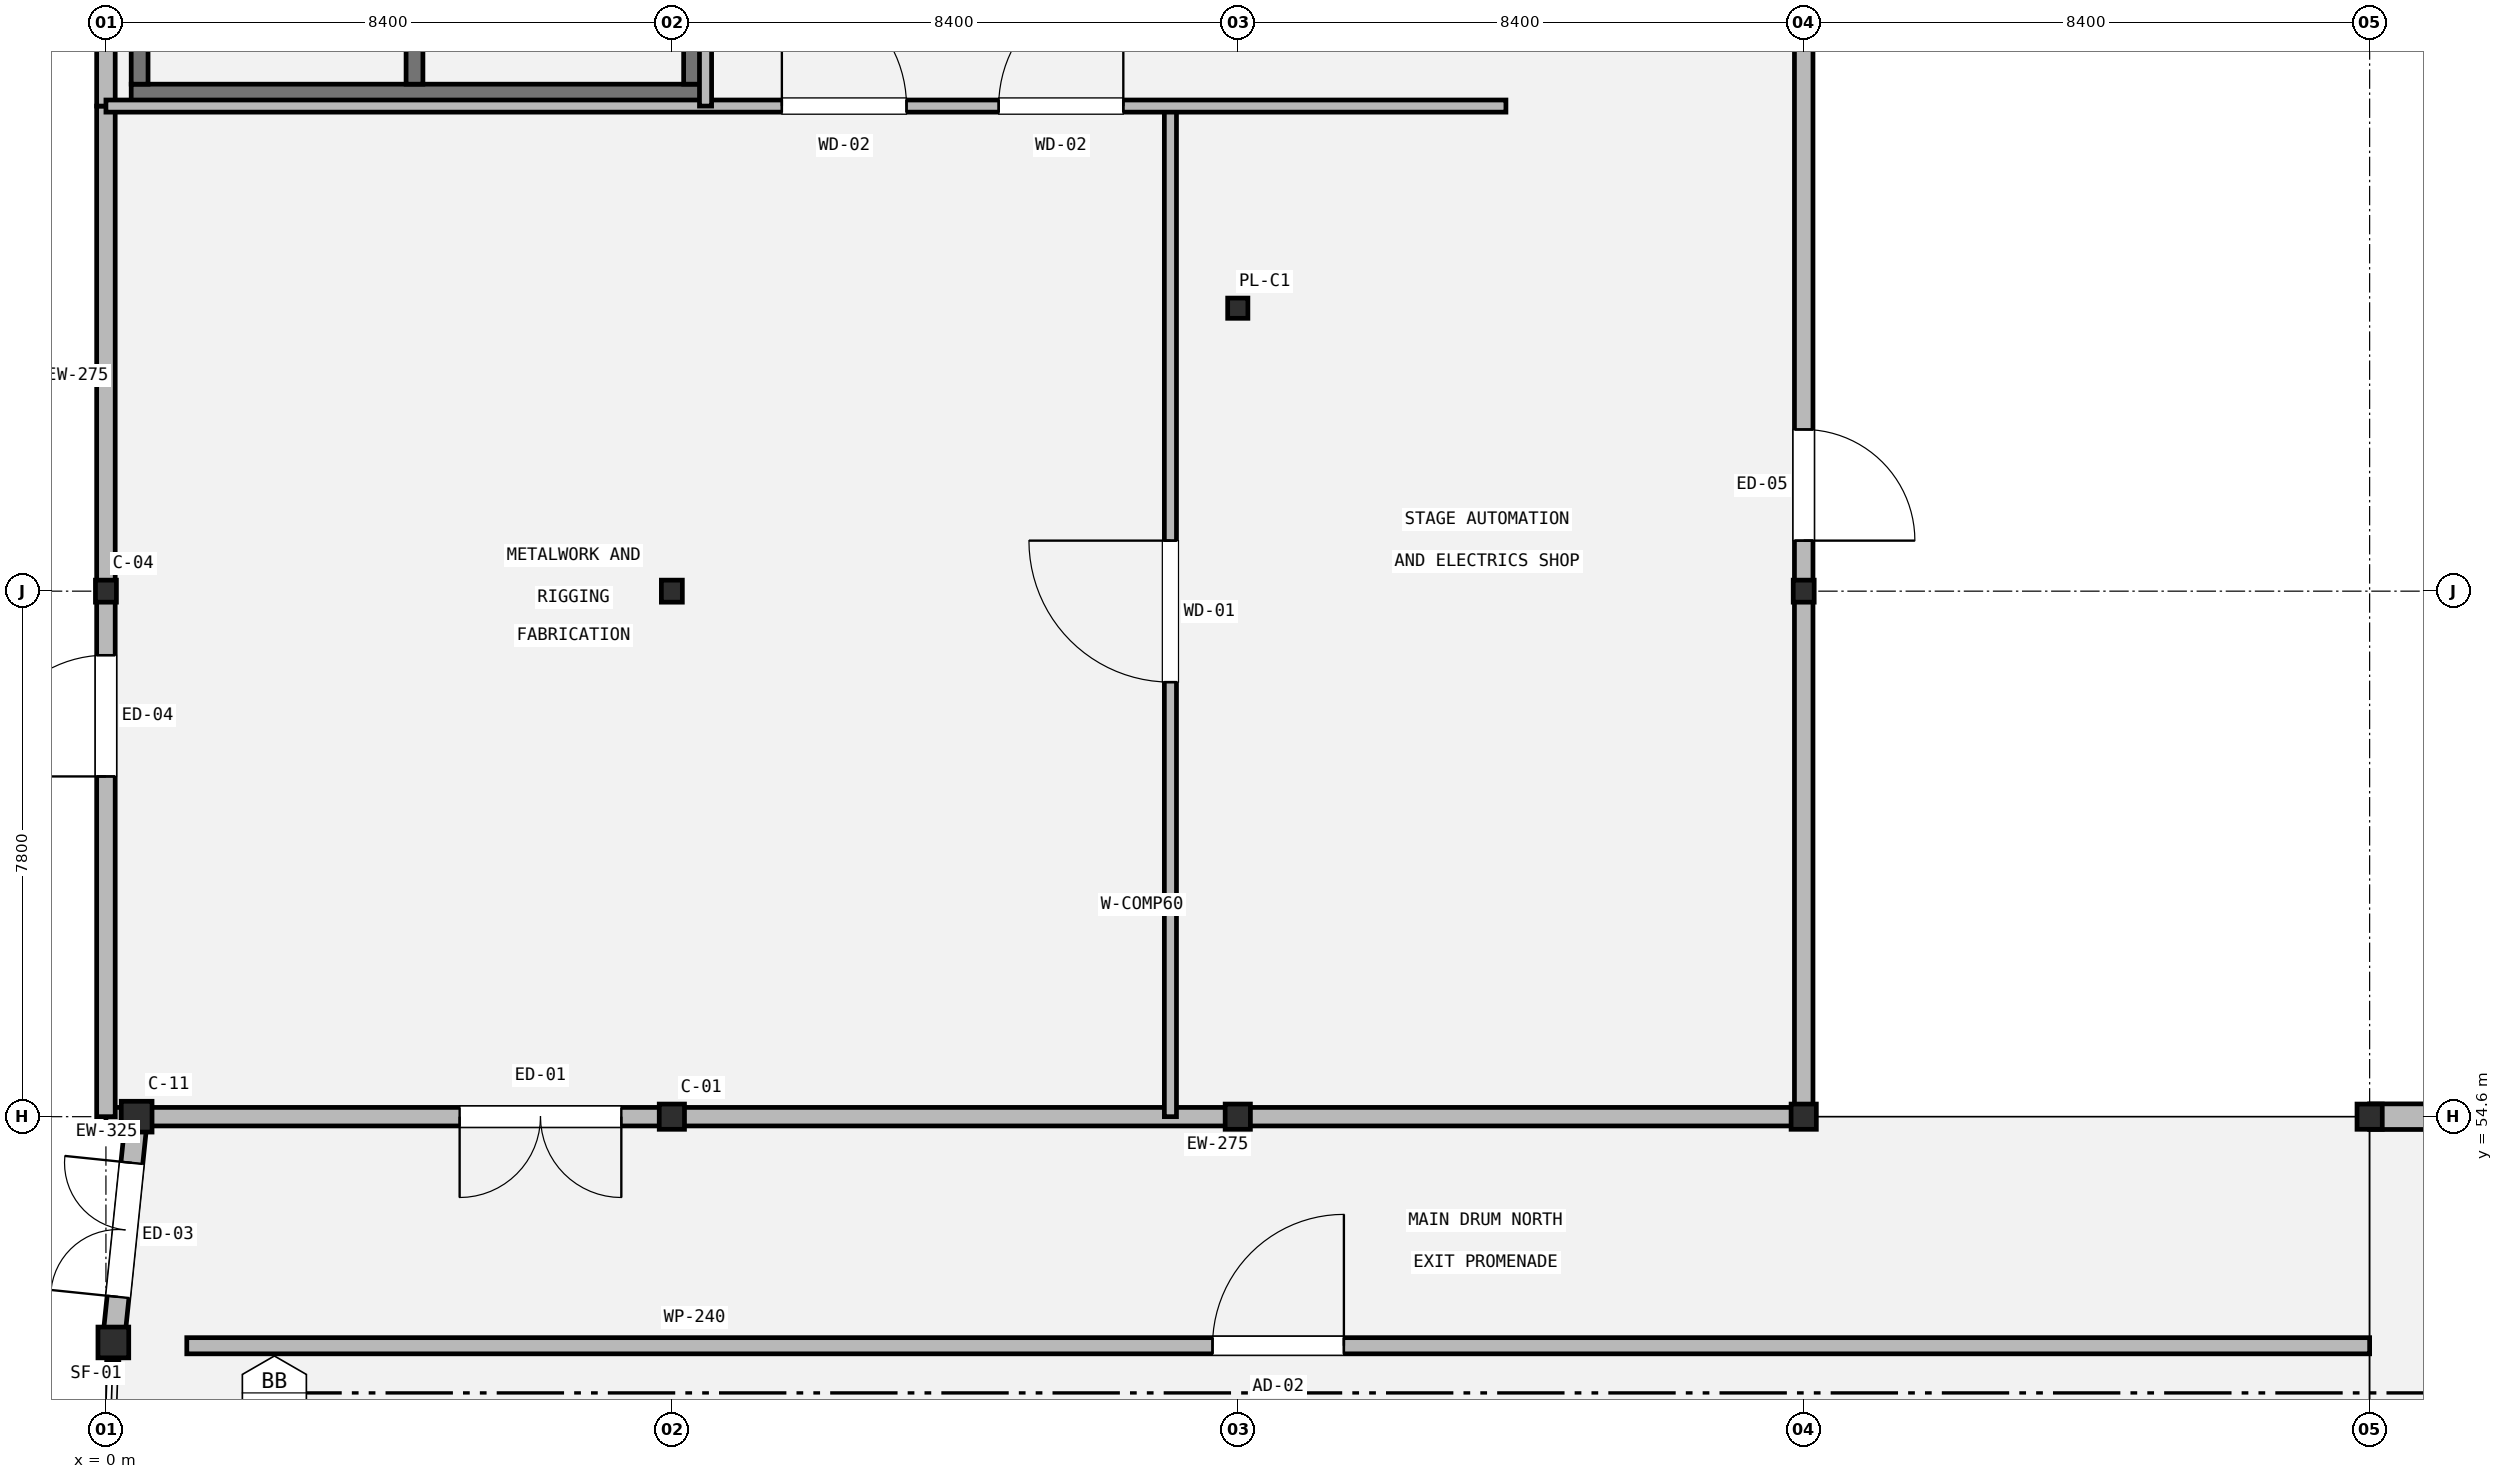
"""IFC4 building model, lengths in metres.
Left out: names, types, materials, properties, quantities, classifications, styles, units other than length and angle.
Written with IfcOpenShell. Run it as: python <this file> out.ifc"""

import sys

from ifc_helpers import new_model, si_unit, direction, frame, frame_2d, origin, origin_2d, place, context, subcontext, project, spatial, rectangle, hollow_rectangle, hollow_circle, i_section, extrude, element, fill, save


model = new_model("IFC4")
c1 = context("Model", 3, precision=1e-05, world=origin(), true_north=direction((0.0, 1.0)))
c2 = subcontext(c1, "Body", "Model", "MODEL_VIEW")
j1 = project(units=[si_unit("LENGTHUNIT", "METRE"), si_unit("PLANEANGLEUNIT", "RADIAN")], contexts=[c1])
p1 = place(None, origin())
s1 = spatial("IfcSite", under=j1, at=p1, CompositionType="ELEMENT")
p2 = place(p1, origin())
s2 = spatial("IfcBuilding", under=s1, at=p2, CompositionType="ELEMENT")
p3 = place(p2, origin())
s3 = spatial("IfcBuildingStorey", under=s2, at=p3, CompositionType="ELEMENT", Elevation=0.0)
for number, where, z_axis, x_axis in (
    (1, (8.4, 54.6, 0.0), (0.0, 0.0, 1.0), (1.0, 0.0, 0.0)),
    (2, (16.8, 54.6, 0.0), (0.0, 0.0, 1.0), (1.0, 0.0, 0.0)),
    (3, (25.2, 54.6, 0.0), (0.0, 0.0, 1.0), (1.0, 0.0, 0.0)),
    (4, (33.6, 54.6, 0.0), (0.0, 0.0, 1.0), (1.0, 0.0, 0.0)),
):
    element("IfcColumn", number, at=place(p3, frame(where, z_axis=z_axis, x_axis=x_axis)), inside=s3, PredefinedType="COLUMN", context=c2, shape_type="SweptSolid", body=[
        extrude(i_section(OverallWidth=0.375, OverallDepth=0.375, WebThickness=0.017, FlangeThickness=0.027, FilletRadius=0.015, at=origin_2d()), origin(), (0.0, 0.0, 1.0), 5.4),
    ])
for number, where, z_axis, x_axis in (
    (5, (0.456, 54.6, 0.0), (0.0, 0.0, 1.0), (1.0, 0.0, 0.0)),
    (6, (0.11, 51.249, 0.0), (0.0, 0.0, 1.0), (1.0, 0.0, 0.0)),
):
    element("IfcColumn", number, at=place(p3, frame(where, z_axis=z_axis, x_axis=x_axis)), inside=s3, PredefinedType="COLUMN", context=c2, shape_type="SweptSolid", body=[
        extrude(hollow_circle(Radius=0.229, WallThickness=0.02, at=origin_2d()), origin(), (0.0, 0.0, 1.0), 5.4),
    ])
for number, where, z_axis, x_axis in (
    (7, (0.0, 62.4, 0.0), (0.0, 0.0, 1.0), (1.0, 0.0, 0.0)),
    (8, (8.4, 62.4, 0.0), (0.0, 0.0, 1.0), (1.0, 0.0, 0.0)),
    (9, (25.2, 62.4, 0.0), (0.0, 0.0, 1.0), (1.0, 0.0, 0.0)),
):
    element("IfcColumn", number, at=place(p3, frame(where, z_axis=z_axis, x_axis=x_axis)), inside=s3, PredefinedType="COLUMN", context=c2, shape_type="SweptSolid", body=[
        extrude(i_section(OverallWidth=0.311, OverallDepth=0.327, WebThickness=0.016, FlangeThickness=0.025, FilletRadius=0.015, at=origin_2d()), origin(), (0.0, 0.0, 1.0), 5.4),
    ])
p4 = place(p3, frame((16.8, 66.6, 0.0), z_axis=(0.0, 0.0, 1.0), x_axis=(1.0, 0.0, 0.0)))
e10 = element("IfcColumn", 10, at=p4, inside=s3, PredefinedType="PILASTER", context=c2, shape_type="SweptSolid", body=[
    extrude(hollow_rectangle(XDim=0.3, YDim=0.3, WallThickness=0.016, at=origin_2d()), origin(), (0.0, 0.0, 1.0), 5.4),
])
p5 = place(p3, frame((0.11, 51.249, 0.0), z_axis=(0.0, 0.0, 1.0), x_axis=(0.102609885069, 0.994721675388, 0.0)))
e11 = element("IfcWall", 11, at=p5, inside=s3, PredefinedType="STANDARD", context=c2, shape_type="SweptSolid", body=[
    extrude(rectangle(XDim=3.369, YDim=0.325, at=frame_2d((1.685, 0.0))), origin(), (0.0, 0.0, 1.0), 4.692),
])
p6 = place(p5, frame((0.68, 0.0, 0.0)))
e12 = element("IfcOpeningElement", 12, at=p6, cuts=e11, PredefinedType="OPENING", context=c2, shape_type="SweptSolid", body=[
    extrude(rectangle(XDim=2.0, YDim=2.45, at=frame_2d((1.0, 1.225))), frame((0.0, 0.172, 0.0), z_axis=(0.0, -1.0, 0.0), x_axis=(1.0, 0.0, 0.0)), (0.0, 0.0, 1.0), 0.345),
])
p7 = place(p3, frame((33.6, 54.6, 0.0), z_axis=(0.0, 0.0, 1.0), x_axis=(1.0, 0.0, 0.0)))
e13 = element("IfcWall", 13, at=p7, inside=s3, PredefinedType="STANDARD", context=c2, shape_type="SweptSolid", body=[
    extrude(rectangle(XDim=8.4, YDim=0.38, at=frame_2d((4.2, 0.0))), origin(), (0.0, 0.0, 1.0), 4.632),
])
p8 = place(p7, frame((5.8, 0.0, 0.0)))
e14 = element("IfcOpeningElement", 14, at=p8, cuts=e13, PredefinedType="OPENING", context=c2, shape_type="SweptSolid", body=[
    extrude(rectangle(XDim=1.8, YDim=2.4, at=frame_2d((0.9, 1.2))), frame((0.0, 0.2, 0.0), z_axis=(0.0, -1.0, 0.0), x_axis=(1.0, 0.0, 0.0)), (0.0, 0.0, 1.0), 0.4),
])
p9 = place(p3, frame((25.2, 54.6, 0.0), z_axis=(0.0, 0.0, 1.0), x_axis=(-1.0, 0.0, 0.0)))
e15 = element("IfcWall", 15, at=p9, inside=s3, PredefinedType="STANDARD", context=c2, shape_type="SweptSolid", body=[
    extrude(rectangle(XDim=25.2, YDim=0.275, at=frame_2d((12.6, 0.0))), origin(), (0.0, 0.0, 1.0), 4.412),
])
p10 = place(p9, frame((17.55, 0.0, 0.0)))
e16 = element("IfcOpeningElement", 16, at=p10, cuts=e15, PredefinedType="OPENING", context=c2, shape_type="SweptSolid", body=[
    extrude(rectangle(XDim=2.4, YDim=2.6, at=frame_2d((1.2, 1.3))), frame((0.0, 0.147, 0.0), z_axis=(0.0, -1.0, 0.0), x_axis=(1.0, 0.0, 0.0)), (0.0, 0.0, 1.0), 0.295),
])
p11 = place(p3, frame((0.0, 54.6, 0.0), z_axis=(0.0, 0.0, 1.0), x_axis=(0.0, 1.0, 0.0)))
e17 = element("IfcWall", 17, at=p11, inside=s3, PredefinedType="STANDARD", context=c2, shape_type="SweptSolid", body=[
    extrude(rectangle(XDim=15.0, YDim=0.275, at=frame_2d((7.5, 0.0))), origin(), (0.0, 0.0, 1.0), 4.622),
])
p12 = place(p11, frame((5.05, 0.0, 0.0)))
e18 = element("IfcOpeningElement", 18, at=p12, cuts=e17, PredefinedType="OPENING", context=c2, shape_type="SweptSolid", body=[
    extrude(rectangle(XDim=1.8, YDim=2.4, at=frame_2d((0.9, 1.2))), frame((0.0, 0.147, 0.0), z_axis=(0.0, -1.0, 0.0), x_axis=(1.0, 0.0, 0.0)), (0.0, 0.0, 1.0), 0.295),
])
p13 = place(p3, frame((0.0, 69.6, 0.0), z_axis=(0.0, 0.0, 1.0), x_axis=(0.0, 1.0, 0.0)))
e19 = element("IfcWall", 19, at=p13, inside=s3, PredefinedType="STANDARD", context=c2, shape_type="SweptSolid", body=[
    extrude(rectangle(XDim=11.0, YDim=0.275, at=frame_2d((5.5, 0.0))), origin(), (0.0, 0.0, 1.0), 4.154),
])
p14 = place(p3, frame((25.2, 70.8, 0.0), z_axis=(0.0, 0.0, 1.0), x_axis=(0.0, -1.0, 0.0)))
e20 = element("IfcWall", 20, at=p14, inside=s3, PredefinedType="STANDARD", context=c2, shape_type="SweptSolid", body=[
    extrude(rectangle(XDim=16.2, YDim=0.275, at=frame_2d((8.1, 0.0))), origin(), (0.0, 0.0, 1.0), 4.154),
])
p15 = place(p14, frame((6.0, 0.0, 0.0)))
e21 = element("IfcOpeningElement", 21, at=p15, cuts=e20, PredefinedType="OPENING", context=c2, shape_type="SweptSolid", body=[
    extrude(rectangle(XDim=1.65, YDim=2.35, at=frame_2d((0.825, 1.175))), frame((0.0, 0.147, 0.0), z_axis=(0.0, -1.0, 0.0), x_axis=(1.0, 0.0, 0.0)), (0.0, 0.0, 1.0), 0.295),
])
p16 = place(p3, frame((8.825, 69.8, 0.0), z_axis=(0.0, 0.0, 1.0), x_axis=(-1.0, 0.0, 0.0)))
e22 = element("IfcWall", 22, at=p16, inside=s3, PredefinedType="SHEAR", context=c2, shape_type="SweptSolid", body=[
    extrude(rectangle(XDim=8.45, YDim=0.25, at=frame_2d((4.225, 0.0))), origin(), (0.0, 0.0, 1.0), 5.18),
])
for number, where, z_axis, x_axis in (
    (23, (0.5, 69.925, 0.0), (0.0, 0.0, 1.0), (0.0, 1.0, 0.0)),
    (24, (8.7, 79.935, 0.0), (0.0, 0.0, 1.0), (0.0, -1.0, 0.0)),
):
    element("IfcWall", number, at=place(p3, frame(where, z_axis=z_axis, x_axis=x_axis)), inside=s3, PredefinedType="SHEAR", context=c2, shape_type="SweptSolid", body=[
        extrude(rectangle(XDim=10.01, YDim=0.25, at=frame_2d((5.005, 0.0))), origin(), (0.0, 0.0, 1.0), 5.18),
    ])
p17 = place(p3, frame((4.58, 79.935, 0.0), z_axis=(0.0, 0.0, 1.0), x_axis=(0.0, -1.0, 0.0)))
e25 = element("IfcWall", 25, at=p17, inside=s3, PredefinedType="SHEAR", context=c2, shape_type="SweptSolid", body=[
    extrude(rectangle(XDim=10.01, YDim=0.25, at=frame_2d((5.005, 0.0))), origin(), (0.0, 0.0, 1.0), 5.18),
])
p18 = place(p17, frame((8.36, 0.0, 0.0)))
e26 = element("IfcOpeningElement", 26, at=p18, cuts=e25, PredefinedType="OPENING", context=c2, shape_type="SweptSolid", body=[
    extrude(rectangle(XDim=1.1, YDim=2.15, at=frame_2d((0.55, 1.075))), frame((0.0, 0.135, 0.0), z_axis=(0.0, -1.0, 0.0), x_axis=(1.0, 0.0, 0.0)), (0.0, 0.0, 1.0), 0.27),
])
p19 = place(p3, frame((1.2, 51.2, 0.0), z_axis=(0.0, 0.0, 1.0), x_axis=(1.0, 0.0, 0.0)))
e27 = element("IfcWall", 27, at=p19, inside=s3, PredefinedType="PARTITIONING", context=c2, shape_type="SweptSolid", body=[
    extrude(rectangle(XDim=32.4, YDim=0.24, at=frame_2d((16.2, 0.0))), origin(), (0.0, 0.0, 1.0), 4.412),
])
p20 = place(p19, frame((15.225, 0.0, 0.0)))
e28 = element("IfcOpeningElement", 28, at=p20, cuts=e27, PredefinedType="OPENING", context=c2, shape_type="SweptSolid", body=[
    extrude(rectangle(XDim=1.95, YDim=2.35, at=frame_2d((0.975, 1.175))), frame((0.0, 0.13, 0.0), z_axis=(0.0, -1.0, 0.0), x_axis=(1.0, 0.0, 0.0)), (0.0, 0.0, 1.0), 0.26),
])
p21 = place(p3, frame((15.8, 54.6, 0.0), z_axis=(0.0, 0.0, 1.0), x_axis=(0.0, 1.0, 0.0)))
e29 = element("IfcWall", 29, at=p21, inside=s3, PredefinedType="STANDARD", context=c2, shape_type="SweptSolid", body=[
    extrude(rectangle(XDim=15.0, YDim=0.18, at=frame_2d((7.5, 0.0))), origin(), (0.0, 0.0, 1.0), 4.311),
])
p22 = place(p21, frame((6.45, 0.0, 0.0)))
e30 = element("IfcOpeningElement", 30, at=p22, cuts=e29, PredefinedType="OPENING", context=c2, shape_type="SweptSolid", body=[
    extrude(rectangle(XDim=2.1, YDim=2.5, at=frame_2d((1.05, 1.25))), frame((0.0, 0.1, 0.0), z_axis=(0.0, -1.0, 0.0), x_axis=(1.0, 0.0, 0.0)), (0.0, 0.0, 1.0), 0.2),
])
p23 = place(p3, frame((0.0, 69.6, 0.0), z_axis=(0.0, 0.0, 1.0), x_axis=(1.0, 0.0, 0.0)))
e31 = element("IfcWall", 31, at=p23, inside=s3, PredefinedType="STANDARD", context=c2, shape_type="SweptSolid", body=[
    extrude(rectangle(XDim=20.78, YDim=0.18, at=frame_2d((10.39, 0.0))), origin(), (0.0, 0.0, 1.0), 4.622),
])
p24 = place(p23, frame((10.033, 0.0, 0.0)))
e32 = element("IfcOpeningElement", 32, at=p24, cuts=e31, PredefinedType="OPENING", context=c2, shape_type="SweptSolid", body=[
    extrude(rectangle(XDim=1.85, YDim=2.4, at=frame_2d((0.925, 1.2))), frame((0.0, 0.1, 0.0), z_axis=(0.0, -1.0, 0.0), x_axis=(1.0, 0.0, 0.0)), (0.0, 0.0, 1.0), 0.2),
])
p25 = place(p23, frame((13.251, 0.0, 0.0)))
e33 = element("IfcOpeningElement", 33, at=p25, cuts=e31, PredefinedType="OPENING", context=c2, shape_type="SweptSolid", body=[
    extrude(rectangle(XDim=1.85, YDim=2.4, at=frame_2d((0.925, 1.2))), frame((0.0, 0.1, 0.0), z_axis=(0.0, -1.0, 0.0), x_axis=(1.0, 0.0, 0.0)), (0.0, 0.0, 1.0), 0.2),
])
p26 = place(p3, frame((8.9, 69.6, 0.0), z_axis=(0.0, 0.0, 1.0), x_axis=(0.0, 1.0, 0.0)))
e34 = element("IfcWall", 34, at=p26, inside=s3, PredefinedType="STANDARD", context=c2, shape_type="SweptSolid", body=[
    extrude(rectangle(XDim=17.4, YDim=0.18, at=frame_2d((8.7, 0.0))), origin(), (0.0, 0.0, 1.0), 4.154),
])
p27 = place(p6, origin())
e35 = element("IfcDoor", 35, at=p27, inside=s3, OperationType="DOUBLE_SWING_LEFT", PredefinedType="DOOR", context=c2, shape_type="SweptSolid", body=[
    extrude(rectangle(XDim=2.0, YDim=2.45, at=frame_2d((1.0, 1.225))), frame((0.0, 0.025, 0.0), z_axis=(0.0, -1.0, 0.0), x_axis=(1.0, 0.0, 0.0)), (0.0, 0.0, 1.0), 0.05),
])
fill(e12, e35)
p28 = place(p10, origin())
e36 = element("IfcDoor", 36, at=p28, inside=s3, OperationType="DOUBLE_SWING_LEFT", PredefinedType="DOOR", context=c2, shape_type="SweptSolid", body=[
    extrude(rectangle(XDim=2.4, YDim=2.6, at=frame_2d((1.2, 1.3))), frame((0.0, 0.025, 0.0), z_axis=(0.0, -1.0, 0.0), x_axis=(1.0, 0.0, 0.0)), (0.0, 0.0, 1.0), 0.05),
])
fill(e16, e36)
p29 = place(p12, origin())
e37 = element("IfcDoor", 37, at=p29, inside=s3, OperationType="SINGLE_SWING_LEFT", PredefinedType="DOOR", context=c2, shape_type="SweptSolid", body=[
    extrude(rectangle(XDim=1.8, YDim=2.4, at=frame_2d((0.9, 1.2))), frame((0.0, 0.025, 0.0), z_axis=(0.0, -1.0, 0.0), x_axis=(1.0, 0.0, 0.0)), (0.0, 0.0, 1.0), 0.05),
])
fill(e18, e37)
p30 = place(p15, origin())
e38 = element("IfcDoor", 38, at=p30, inside=s3, OperationType="SINGLE_SWING_RIGHT", PredefinedType="DOOR", context=c2, shape_type="SweptSolid", body=[
    extrude(rectangle(XDim=1.65, YDim=2.35, at=frame_2d((0.825, 1.175))), frame((0.0, 0.025, 0.0), z_axis=(0.0, -1.0, 0.0), x_axis=(1.0, 0.0, 0.0)), (0.0, 0.0, 1.0), 0.05),
])
fill(e21, e38)
p31 = place(p20, origin())
e39 = element("IfcDoor", 39, at=p31, inside=s3, OperationType="SINGLE_SWING_RIGHT", PredefinedType="DOOR", context=c2, shape_type="SweptSolid", body=[
    extrude(rectangle(XDim=1.95, YDim=2.35, at=frame_2d((0.975, 1.175))), frame((0.0, 0.025, 0.0), z_axis=(0.0, -1.0, 0.0), x_axis=(1.0, 0.0, 0.0)), (0.0, 0.0, 1.0), 0.05),
])
fill(e28, e39)
p32 = place(p22, origin())
e40 = element("IfcDoor", 40, at=p32, inside=s3, OperationType="SINGLE_SWING_RIGHT", PredefinedType="DOOR", context=c2, shape_type="SweptSolid", body=[
    extrude(rectangle(XDim=2.1, YDim=2.5, at=frame_2d((1.05, 1.25))), frame((0.0, 0.025, 0.0), z_axis=(0.0, -1.0, 0.0), x_axis=(1.0, 0.0, 0.0)), (0.0, 0.0, 1.0), 0.05),
])
fill(e30, e40)
p33 = place(p24, origin())
e41 = element("IfcDoor", 41, at=p33, inside=s3, OperationType="SINGLE_SWING_LEFT", PredefinedType="DOOR", context=c2, shape_type="SweptSolid", body=[
    extrude(rectangle(XDim=1.85, YDim=2.4, at=frame_2d((0.925, 1.2))), frame((0.0, 0.025, 0.0), z_axis=(0.0, -1.0, 0.0), x_axis=(1.0, 0.0, 0.0)), (0.0, 0.0, 1.0), 0.05),
])
fill(e32, e41)
p34 = place(p25, origin())
e42 = element("IfcDoor", 42, at=p34, inside=s3, OperationType="SINGLE_SWING_RIGHT", PredefinedType="DOOR", context=c2, shape_type="SweptSolid", body=[
    extrude(rectangle(XDim=1.85, YDim=2.4, at=frame_2d((0.925, 1.2))), frame((0.0, 0.025, 0.0), z_axis=(0.0, -1.0, 0.0), x_axis=(1.0, 0.0, 0.0)), (0.0, 0.0, 1.0), 0.05),
])
fill(e33, e42)
save(model, sys.argv[1])
